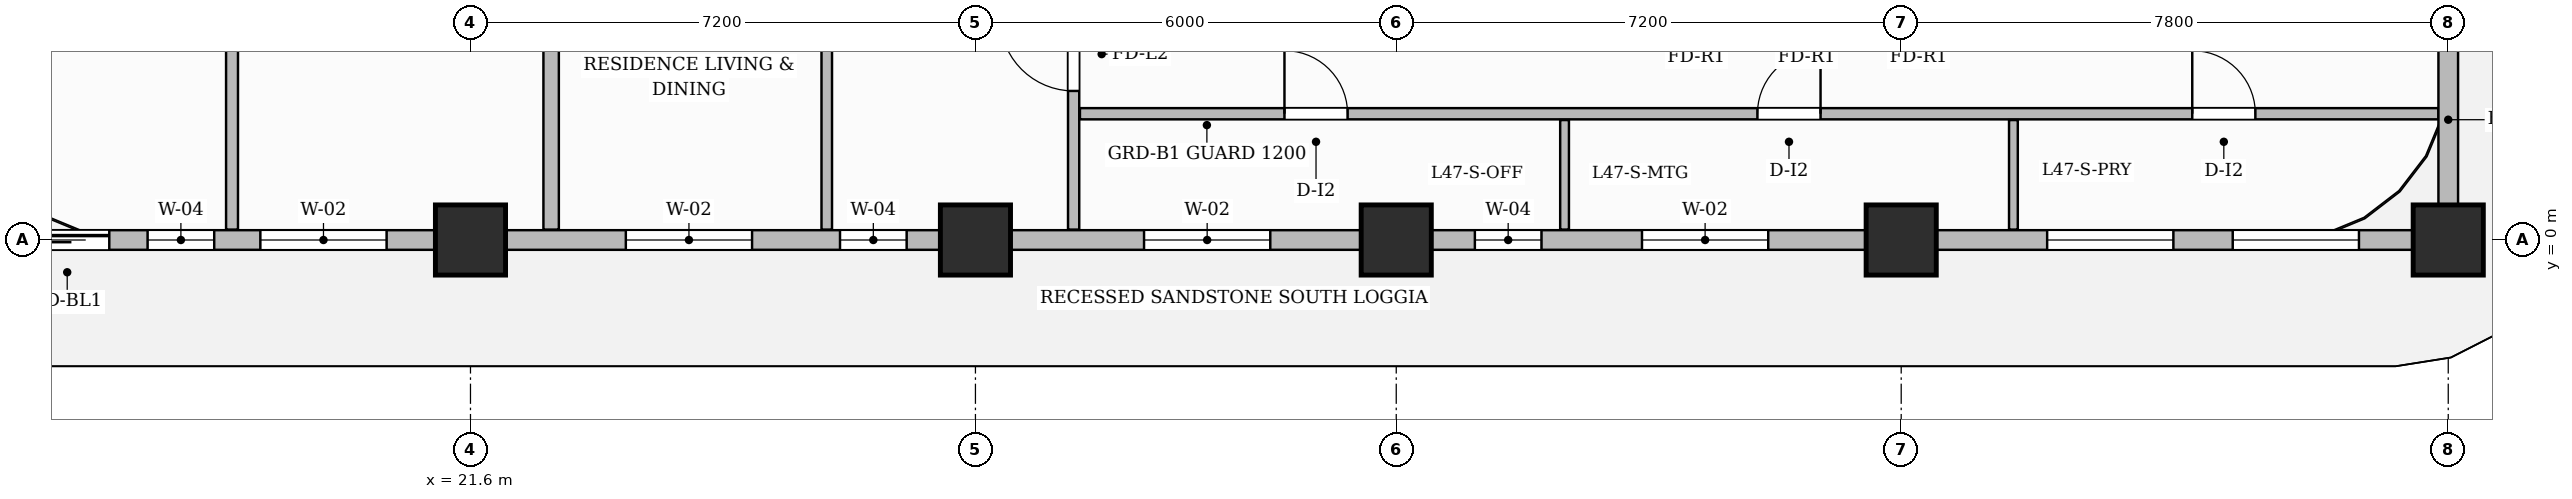
"""IFC4 building model, lengths in metres.
Left out: names, types, materials, properties, quantities, classifications, styles, units other than length and angle.
Written with IfcOpenShell. Run it as: python <this file> out.ifc"""

import sys

from ifc_helpers import new_model, si_unit, direction, frame, frame_2d, origin, origin_2d, place, context, subcontext, project, spatial, rectangle, extrude, source, transform, mapped, element, fill, save


model = new_model("IFC4")
c1 = context("Model", 3, precision=1e-05, world=origin(), true_north=direction((0.0, 1.0)))
c2 = subcontext(c1, "Body", "Model", "MODEL_VIEW")
j1 = project(units=[si_unit("LENGTHUNIT", "METRE"), si_unit("PLANEANGLEUNIT", "RADIAN")], contexts=[c1])
p1 = place(None, origin())
s1 = spatial("IfcSite", under=j1, at=p1, CompositionType="ELEMENT")
p2 = place(p1, origin())
s2 = spatial("IfcBuilding", under=s1, at=p2, CompositionType="ELEMENT")
p3 = place(p2, frame((0.0, 0.0, 188.8)))
s3 = spatial("IfcBuildingStorey", under=s2, at=p3, CompositionType="ELEMENT", Elevation=188.8)
m1 = source(origin(), c2, "Body", "SweptSolid", [
    extrude(rectangle(XDim=1.0, YDim=1.0, at=origin_2d()), origin(), (0.0, 0.0, 1.0), 3.85),
])
for number, where, z_axis, x_axis in (
    (1, (21.6, 0.0, 0.0), (0.0, 0.0, 1.0), (1.0, 0.0, 0.0)),
    (2, (28.8, 0.0, 0.0), (0.0, 0.0, 1.0), (1.0, 0.0, 0.0)),
    (3, (34.8, 0.0, 0.0), (0.0, 0.0, 1.0), (1.0, 0.0, 0.0)),
    (4, (42.0, 0.0, 0.0), (0.0, 0.0, 1.0), (1.0, 0.0, 0.0)),
    (5, (49.8, 0.0, 0.0), (0.0, 0.0, 1.0), (1.0, 0.0, 0.0)),
):
    element("IfcColumn", number, at=place(p3, frame(where, z_axis=z_axis, x_axis=x_axis)), inside=s3, PredefinedType="COLUMN", context=c2, shape_type="MappedRepresentation", body=[
        mapped(m1, transform((0.0, 0.0, 0.0), scale=1.0)),
    ])
p4 = place(p3, frame((30.2, 0.148, 0.0), z_axis=(0.0, 0.0, 1.0), x_axis=(0.0, 1.0, 0.0)))
e6 = element("IfcWall", 6, at=p4, inside=s3, PredefinedType="PARTITIONING", context=c2, shape_type="SweptSolid", body=[
    extrude(rectangle(XDim=9.312, YDim=0.16, at=frame_2d((4.656, 0.0))), origin(), (0.0, 0.0, 1.0), 3.6),
])
p5 = place(p4, frame((1.977, 0.0, 0.0)))
e7 = element("IfcOpeningElement", 7, at=p5, cuts=e6, PredefinedType="OPENING", context=c2, shape_type="SweptSolid", body=[
    extrude(rectangle(XDim=1.05, YDim=2.15, at=frame_2d((0.525, 1.075))), frame((0.0, 0.09, 0.0), z_axis=(0.0, -1.0, 0.0), x_axis=(1.0, 0.0, 0.0)), (0.0, 0.0, 1.0), 0.18),
])
p6 = place(p3, frame((30.29, 1.8, 0.0), z_axis=(0.0, 0.0, 1.0), x_axis=(1.0, 0.0, 0.0)))
e8 = element("IfcWall", 8, at=p6, inside=s3, PredefinedType="PARTITIONING", context=c2, shape_type="SweptSolid", body=[
    extrude(rectangle(XDim=19.37, YDim=0.16, at=frame_2d((9.685, 0.0))), origin(), (0.0, 0.0, 1.0), 3.6),
])
p7 = place(p6, frame((2.916, 0.0, 0.0)))
e9 = element("IfcOpeningElement", 9, at=p7, cuts=e8, PredefinedType="OPENING", context=c2, shape_type="SweptSolid", body=[
    extrude(rectangle(XDim=0.9, YDim=2.15, at=frame_2d((0.45, 1.075))), frame((0.0, 0.09, 0.0), z_axis=(0.0, -1.0, 0.0), x_axis=(1.0, 0.0, 0.0)), (0.0, 0.0, 1.0), 0.18),
])
p8 = place(p6, frame((9.66, 0.0, 0.0)))
e10 = element("IfcOpeningElement", 10, at=p8, cuts=e8, PredefinedType="OPENING", context=c2, shape_type="SweptSolid", body=[
    extrude(rectangle(XDim=0.9, YDim=2.15, at=frame_2d((0.45, 1.075))), frame((0.0, 0.09, 0.0), z_axis=(0.0, -1.0, 0.0), x_axis=(1.0, 0.0, 0.0)), (0.0, 0.0, 1.0), 0.18),
])
p9 = place(p6, frame((15.86, 0.0, 0.0)))
e11 = element("IfcOpeningElement", 11, at=p9, cuts=e8, PredefinedType="OPENING", context=c2, shape_type="SweptSolid", body=[
    extrude(rectangle(XDim=0.9, YDim=2.15, at=frame_2d((0.45, 1.075))), frame((0.0, 0.09, 0.0), z_axis=(0.0, -1.0, 0.0), x_axis=(1.0, 0.0, 0.0)), (0.0, 0.0, 1.0), 0.18),
])
for number, where, z_axis, x_axis in (
    (12, (37.2, 0.148, 0.0), (0.0, 0.0, 1.0), (0.0, 1.0, 0.0)),
    (13, (43.6, 0.148, 0.0), (0.0, 0.0, 1.0), (0.0, 1.0, 0.0)),
):
    element("IfcWall", number, at=place(p3, frame(where, z_axis=z_axis, x_axis=x_axis)), inside=s3, PredefinedType="PARTITIONING", context=c2, shape_type="SweptSolid", body=[
        extrude(rectangle(XDim=1.562, YDim=0.125, at=frame_2d((0.781, 0.0))), origin(), (0.0, 0.0, 1.0), 3.6),
    ])
p10 = place(p3, frame((18.2, 0.148, 0.0), z_axis=(0.0, 0.0, 1.0), x_axis=(0.0, 1.0, 0.0)))
e14 = element("IfcWall", 14, at=p10, inside=s3, PredefinedType="PARTITIONING", context=c2, shape_type="SweptSolid", body=[
    extrude(rectangle(XDim=9.312, YDim=0.17, at=frame_2d((4.656, 0.0))), origin(), (0.0, 0.0, 1.0), 3.285),
])
p11 = place(p3, frame((22.75, 0.148, 0.0), z_axis=(0.0, 0.0, 1.0), x_axis=(0.0, 1.0, 0.0)))
e15 = element("IfcWall", 15, at=p11, inside=s3, PredefinedType="PARTITIONING", context=c2, shape_type="SweptSolid", body=[
    extrude(rectangle(XDim=9.312, YDim=0.22, at=frame_2d((4.656, 0.0))), origin(), (0.0, 0.0, 1.0), 3.6),
])
p12 = place(p3, frame((26.68, 0.148, 0.0), z_axis=(0.0, 0.0, 1.0), x_axis=(0.0, 1.0, 0.0)))
e16 = element("IfcWall", 16, at=p12, inside=s3, PredefinedType="PARTITIONING", context=c2, shape_type="SweptSolid", body=[
    extrude(rectangle(XDim=9.312, YDim=0.15, at=frame_2d((4.656, 0.0))), origin(), (0.0, 0.0, 1.0), 3.6),
])
p13 = place(p12, frame((7.877, 0.0, 0.0)))
e17 = element("IfcOpeningElement", 17, at=p13, cuts=e16, PredefinedType="OPENING", context=c2, shape_type="SweptSolid", body=[
    extrude(rectangle(XDim=0.9, YDim=2.15, at=frame_2d((0.45, 1.075))), frame((0.0, 0.085, 0.0), z_axis=(0.0, -1.0, 0.0), x_axis=(1.0, 0.0, 0.0)), (0.0, 0.0, 1.0), 0.17),
])
p14 = place(p3, frame((14.4, 0.0, 0.0), z_axis=(0.0, 0.0, 1.0), x_axis=(1.0, 0.0, 0.0)))
e18 = element("IfcWall", 18, at=p14, inside=s3, PredefinedType="SOLIDWALL", context=c2, shape_type="SweptSolid", body=[
    extrude(rectangle(XDim=35.4, YDim=0.28, at=frame_2d((17.7, 0.0))), origin(), (0.0, 0.0, 1.0), 3.085),
])
p15 = place(p14, frame((0.85, 0.0, 0.0)))
e19 = element("IfcOpeningElement", 19, at=p15, cuts=e18, PredefinedType="OPENING", context=c2, shape_type="SweptSolid", body=[
    extrude(rectangle(XDim=1.2, YDim=2.2, at=frame_2d((0.6, 1.1))), frame((0.0, 0.15, 0.0), z_axis=(0.0, -1.0, 0.0), x_axis=(1.0, 0.0, 0.0)), (0.0, 0.0, 1.0), 0.3),
])
p16 = place(p14, frame((2.596, 0.0, 0.8)))
e20 = element("IfcOpeningElement", 20, at=p16, cuts=e18, PredefinedType="OPENING", context=c2, shape_type="SweptSolid", body=[
    extrude(rectangle(XDim=0.95, YDim=1.75, at=frame_2d((0.475, 0.875))), frame((0.0, 0.15, 0.0), z_axis=(0.0, -1.0, 0.0), x_axis=(1.0, 0.0, 0.0)), (0.0, 0.0, 1.0), 0.3),
])
p17 = place(p14, frame((4.204, 0.0, 0.8)))
e21 = element("IfcOpeningElement", 21, at=p17, cuts=e18, PredefinedType="OPENING", context=c2, shape_type="SweptSolid", body=[
    extrude(rectangle(XDim=1.8, YDim=1.85, at=frame_2d((0.9, 0.925))), frame((0.0, 0.15, 0.0), z_axis=(0.0, -1.0, 0.0), x_axis=(1.0, 0.0, 0.0)), (0.0, 0.0, 1.0), 0.3),
])
p18 = place(p14, frame((9.415, 0.0, 0.8)))
e22 = element("IfcOpeningElement", 22, at=p18, cuts=e18, PredefinedType="OPENING", context=c2, shape_type="SweptSolid", body=[
    extrude(rectangle(XDim=1.8, YDim=1.85, at=frame_2d((0.9, 0.925))), frame((0.0, 0.15, 0.0), z_axis=(0.0, -1.0, 0.0), x_axis=(1.0, 0.0, 0.0)), (0.0, 0.0, 1.0), 0.3),
])
p19 = place(p14, frame((12.469, 0.0, 0.8)))
e23 = element("IfcOpeningElement", 23, at=p19, cuts=e18, PredefinedType="OPENING", context=c2, shape_type="SweptSolid", body=[
    extrude(rectangle(XDim=0.95, YDim=1.75, at=frame_2d((0.475, 0.875))), frame((0.0, 0.15, 0.0), z_axis=(0.0, -1.0, 0.0), x_axis=(1.0, 0.0, 0.0)), (0.0, 0.0, 1.0), 0.3),
])
p20 = place(p14, frame((16.804, 0.0, 0.8)))
e24 = element("IfcOpeningElement", 24, at=p20, cuts=e18, PredefinedType="OPENING", context=c2, shape_type="SweptSolid", body=[
    extrude(rectangle(XDim=1.8, YDim=1.85, at=frame_2d((0.9, 0.925))), frame((0.0, 0.15, 0.0), z_axis=(0.0, -1.0, 0.0), x_axis=(1.0, 0.0, 0.0)), (0.0, 0.0, 1.0), 0.3),
])
p21 = place(p14, frame((21.521, 0.0, 0.8)))
e25 = element("IfcOpeningElement", 25, at=p21, cuts=e18, PredefinedType="OPENING", context=c2, shape_type="SweptSolid", body=[
    extrude(rectangle(XDim=0.95, YDim=1.75, at=frame_2d((0.475, 0.875))), frame((0.0, 0.15, 0.0), z_axis=(0.0, -1.0, 0.0), x_axis=(1.0, 0.0, 0.0)), (0.0, 0.0, 1.0), 0.3),
])
p22 = place(p14, frame((23.904, 0.0, 0.8)))
e26 = element("IfcOpeningElement", 26, at=p22, cuts=e18, PredefinedType="OPENING", context=c2, shape_type="SweptSolid", body=[
    extrude(rectangle(XDim=1.8, YDim=1.85, at=frame_2d((0.9, 0.925))), frame((0.0, 0.15, 0.0), z_axis=(0.0, -1.0, 0.0), x_axis=(1.0, 0.0, 0.0)), (0.0, 0.0, 1.0), 0.3),
])
p23 = place(p14, frame((29.681, 0.0, 0.8)))
e27 = element("IfcOpeningElement", 27, at=p23, cuts=e18, PredefinedType="OPENING", context=c2, shape_type="SweptSolid", body=[
    extrude(rectangle(XDim=1.8, YDim=1.85, at=frame_2d((0.9, 0.925))), frame((0.0, 0.15, 0.0), z_axis=(0.0, -1.0, 0.0), x_axis=(1.0, 0.0, 0.0)), (0.0, 0.0, 1.0), 0.3),
])
p24 = place(p14, frame((32.327, 0.0, 0.8)))
e28 = element("IfcOpeningElement", 28, at=p24, cuts=e18, PredefinedType="OPENING", context=c2, shape_type="SweptSolid", body=[
    extrude(rectangle(XDim=1.8, YDim=1.85, at=frame_2d((0.9, 0.925))), frame((0.0, 0.15, 0.0), z_axis=(0.0, -1.0, 0.0), x_axis=(1.0, 0.0, 0.0)), (0.0, 0.0, 1.0), 0.3),
])
p25 = place(p3, frame((49.8, 0.05, 0.0), z_axis=(0.0, 0.0, 1.0), x_axis=(0.0, 1.0, 0.0)))
e29 = element("IfcWall", 29, at=p25, inside=s3, PredefinedType="SOLIDWALL", context=c2, shape_type="SweptSolid", body=[
    extrude(rectangle(XDim=3.33, YDim=0.28, at=frame_2d((1.665, 0.0))), origin(), (0.0, 0.0, 1.0), 3.6),
])
m2 = source(origin(), c2, "Body", "SweptSolid", [
    extrude(rectangle(XDim=1.05, YDim=2.15, at=frame_2d((0.525, 1.075))), frame((0.0, 0.025, 0.0), z_axis=(0.0, -1.0, 0.0), x_axis=(1.0, 0.0, 0.0)), (0.0, 0.0, 1.0), 0.05),
])
p26 = place(p5, origin())
e30 = element("IfcDoor", 30, at=p26, inside=s3, OperationType="SINGLE_SWING_RIGHT", PredefinedType="DOOR", context=c2, shape_type="MappedRepresentation", body=[
    mapped(m2, transform((0.0, 0.0, 0.0), scale=1.0)),
])
fill(e7, e30)
m3 = source(origin(), c2, "Body", "SweptSolid", [
    extrude(rectangle(XDim=0.9, YDim=2.15, at=frame_2d((0.45, 1.075))), frame((0.0, 0.025, 0.0), z_axis=(0.0, -1.0, 0.0), x_axis=(1.0, 0.0, 0.0)), (0.0, 0.0, 1.0), 0.05),
])
p27 = place(p7, origin())
e31 = element("IfcDoor", 31, at=p27, inside=s3, OperationType="SINGLE_SWING_LEFT", PredefinedType="DOOR", context=c2, shape_type="MappedRepresentation", body=[
    mapped(m3, transform((0.0, 0.0, 0.0), scale=1.0)),
])
fill(e9, e31)
p28 = place(p8, origin())
e32 = element("IfcDoor", 32, at=p28, inside=s3, OperationType="SINGLE_SWING_RIGHT", PredefinedType="DOOR", context=c2, shape_type="MappedRepresentation", body=[
    mapped(m3, transform((0.0, 0.0, 0.0), scale=1.0)),
])
fill(e10, e32)
p29 = place(p9, origin())
e33 = element("IfcDoor", 33, at=p29, inside=s3, OperationType="SINGLE_SWING_LEFT", PredefinedType="DOOR", context=c2, shape_type="MappedRepresentation", body=[
    mapped(m3, transform((0.0, 0.0, 0.0), scale=1.0)),
])
fill(e11, e33)
m4 = source(origin(), c2, "Body", "SweptSolid", [
    extrude(rectangle(XDim=1.2, YDim=2.2, at=frame_2d((0.6, 1.1))), frame((0.0, 0.025, 0.0), z_axis=(0.0, -1.0, 0.0), x_axis=(1.0, 0.0, 0.0)), (0.0, 0.0, 1.0), 0.05),
])
p30 = place(p15, origin())
e34 = element("IfcDoor", 34, at=p30, inside=s3, OperationType="SLIDING_TO_LEFT", PredefinedType="DOOR", context=c2, shape_type="MappedRepresentation", body=[
    mapped(m4, transform((0.0, 0.0, 0.0), scale=1.0)),
])
fill(e19, e34)
m5 = source(origin(), c2, "Body", "SweptSolid", [
    extrude(rectangle(XDim=0.95, YDim=1.75, at=frame_2d((0.475, 0.875))), frame((0.0, 0.03, 0.0), z_axis=(0.0, -1.0, 0.0), x_axis=(1.0, 0.0, 0.0)), (0.0, 0.0, 1.0), 0.06),
])
p31 = place(p16, origin())
e35 = element("IfcWindow", 35, at=p31, inside=s3, PartitioningType="SINGLE_PANEL", PredefinedType="WINDOW", context=c2, shape_type="MappedRepresentation", body=[
    mapped(m5, transform((0.0, 0.0, 0.0), scale=1.0)),
])
fill(e20, e35)
m6 = source(origin(), c2, "Body", "SweptSolid", [
    extrude(rectangle(XDim=1.8, YDim=1.85, at=frame_2d((0.9, 0.925))), frame((0.0, 0.03, 0.0), z_axis=(0.0, -1.0, 0.0), x_axis=(1.0, 0.0, 0.0)), (0.0, 0.0, 1.0), 0.06),
])
p32 = place(p17, origin())
e36 = element("IfcWindow", 36, at=p32, inside=s3, PartitioningType="DOUBLE_PANEL_VERTICAL", PredefinedType="WINDOW", context=c2, shape_type="MappedRepresentation", body=[
    mapped(m6, transform((0.0, 0.0, 0.0), scale=1.0)),
])
fill(e21, e36)
p33 = place(p18, origin())
e37 = element("IfcWindow", 37, at=p33, inside=s3, PartitioningType="DOUBLE_PANEL_VERTICAL", PredefinedType="WINDOW", context=c2, shape_type="MappedRepresentation", body=[
    mapped(m6, transform((0.0, 0.0, 0.0), scale=1.0)),
])
fill(e22, e37)
p34 = place(p19, origin())
e38 = element("IfcWindow", 38, at=p34, inside=s3, PartitioningType="SINGLE_PANEL", PredefinedType="WINDOW", context=c2, shape_type="MappedRepresentation", body=[
    mapped(m5, transform((0.0, 0.0, 0.0), scale=1.0)),
])
fill(e23, e38)
p35 = place(p20, origin())
e39 = element("IfcWindow", 39, at=p35, inside=s3, PartitioningType="DOUBLE_PANEL_VERTICAL", PredefinedType="WINDOW", context=c2, shape_type="MappedRepresentation", body=[
    mapped(m6, transform((0.0, 0.0, 0.0), scale=1.0)),
])
fill(e24, e39)
p36 = place(p21, origin())
e40 = element("IfcWindow", 40, at=p36, inside=s3, PartitioningType="SINGLE_PANEL", PredefinedType="WINDOW", context=c2, shape_type="MappedRepresentation", body=[
    mapped(m5, transform((0.0, 0.0, 0.0), scale=1.0)),
])
fill(e25, e40)
p37 = place(p22, origin())
e41 = element("IfcWindow", 41, at=p37, inside=s3, PartitioningType="DOUBLE_PANEL_VERTICAL", PredefinedType="WINDOW", context=c2, shape_type="MappedRepresentation", body=[
    mapped(m6, transform((0.0, 0.0, 0.0), scale=1.0)),
])
fill(e26, e41)
p38 = place(p23, origin())
e42 = element("IfcWindow", 42, at=p38, inside=s3, PartitioningType="DOUBLE_PANEL_VERTICAL", PredefinedType="WINDOW", context=c2, shape_type="MappedRepresentation", body=[
    mapped(m6, transform((0.0, 0.0, 0.0), scale=1.0)),
])
fill(e27, e42)
p39 = place(p24, origin())
e43 = element("IfcWindow", 43, at=p39, inside=s3, PartitioningType="DOUBLE_PANEL_VERTICAL", PredefinedType="WINDOW", context=c2, shape_type="MappedRepresentation", body=[
    mapped(m6, transform((0.0, 0.0, 0.0), scale=1.0)),
])
fill(e28, e43)
save(model, sys.argv[1])
